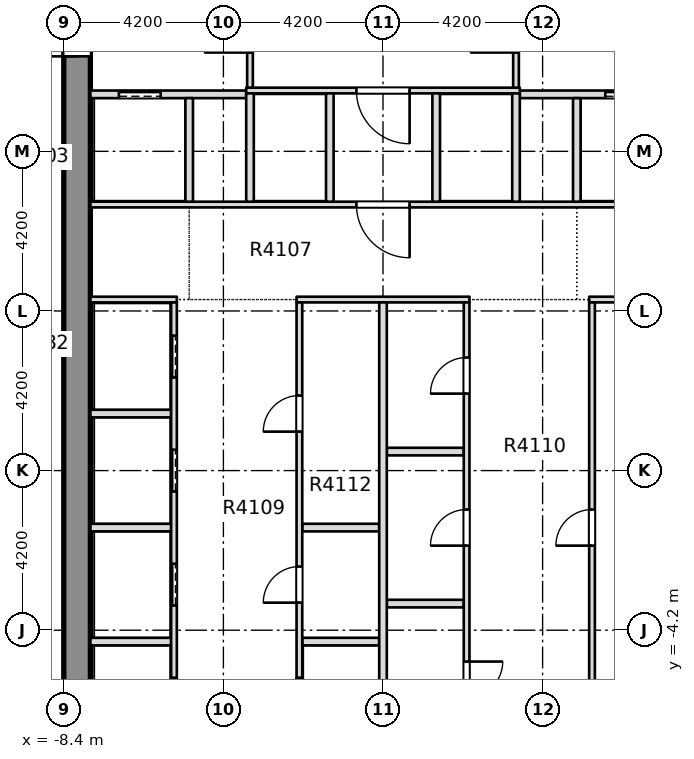
"""IFC4 building model, lengths in metres.
Left out: names, types, materials, properties, quantities, classifications, styles, units other than length and angle.
Written with IfcOpenShell. Run it as: python <this file> out.ifc"""

import sys

from ifc_helpers import new_model, si_unit, direction, frame, frame_2d, origin, place, context, subcontext, project, spatial, rectangle, extrude, element, fill, save


model = new_model("IFC4")
c1 = context("Model", 3, precision=1e-05, world=origin(), true_north=direction((0.0, 1.0)))
c2 = subcontext(c1, "Body", "Model", "MODEL_VIEW")
j1 = project(units=[si_unit("LENGTHUNIT", "METRE"), si_unit("PLANEANGLEUNIT", "RADIAN")], contexts=[c1])
p1 = place(None, origin())
s1 = spatial("IfcSite", under=j1, at=p1, CompositionType="ELEMENT")
p2 = place(p1, origin())
s2 = spatial("IfcBuilding", under=s1, at=p2, CompositionType="ELEMENT")
p3 = place(p2, frame((0.0, 0.0, 160.7)))
s3 = spatial("IfcBuildingStorey", under=s2, at=p3, CompositionType="ELEMENT", Elevation=160.7)
p4 = place(p3, frame((-8.05, -8.4, -0.4), z_axis=(0.0, 0.0, 1.0), x_axis=(0.0, 1.0, 0.0)))
e1 = element("IfcWall", 1, at=p4, inside=s3, PredefinedType="SOLIDWALL", context=c2, shape_type="SweptSolid", body=[
    extrude(rectangle(XDim=30.15, YDim=0.7, at=frame_2d((15.075, 0.0))), origin(), (0.0, 0.0, 1.0), 3.45),
])
p5 = place(p4, frame((19.3, 0.0, 0.4)))
e2 = element("IfcOpeningElement", 2, at=p5, cuts=e1, PredefinedType="OPENING", context=c2, shape_type="SweptSolid", body=[
    extrude(rectangle(XDim=1.2, YDim=2.1, at=frame_2d((0.6, 1.05))), frame((0.0, 0.36, 0.0), z_axis=(0.0, -1.0, 0.0), x_axis=(1.0, 0.0, 0.0)), (0.0, 0.0, 1.0), 0.72),
])
p6 = place(p3, frame((-7.699, -4.5, 0.0), z_axis=(0.0, 0.0, 1.0), x_axis=(1.0, 0.0, 0.0)))
e3 = element("IfcWall", 3, at=p6, inside=s3, PredefinedType="PARTITIONING", context=c2, shape_type="SweptSolid", body=[
    extrude(rectangle(XDim=2.124, YDim=0.2, at=frame_2d((1.062, 0.0))), origin(), (0.0, 0.0, 1.0), 3.05),
])
for number, where, z_axis, x_axis in (
    (4, (-2.125, -4.5, 0.0), (0.0, 0.0, 1.0), (1.0, 0.0, 0.0)),
    (5, (0.1, -3.5, 0.0), (0.0, 0.0, 1.0), (1.0, 0.0, 0.0)),
):
    element("IfcWall", number, at=place(p3, frame(where, z_axis=z_axis, x_axis=x_axis)), inside=s3, PredefinedType="PARTITIONING", context=c2, shape_type="SweptSolid", body=[
        extrude(rectangle(XDim=2.025, YDim=0.2, at=frame_2d((1.012, 0.0))), origin(), (0.0, 0.0, 1.0), 3.05),
    ])
p7 = place(p3, frame((-7.699, -1.5, 0.0), z_axis=(0.0, 0.0, 1.0), x_axis=(1.0, 0.0, 0.0)))
e6 = element("IfcWall", 6, at=p7, inside=s3, PredefinedType="PARTITIONING", context=c2, shape_type="SweptSolid", body=[
    extrude(rectangle(XDim=2.124, YDim=0.2, at=frame_2d((1.062, 0.0))), origin(), (0.0, 0.0, 1.0), 3.05),
])
for number, where, z_axis, x_axis in (
    (7, (-2.125, -1.5, 0.0), (0.0, 0.0, 1.0), (1.0, 0.0, 0.0)),
    (8, (0.1, 0.5, 0.0), (0.0, 0.0, 1.0), (1.0, 0.0, 0.0)),
):
    element("IfcWall", number, at=place(p3, frame(where, z_axis=z_axis, x_axis=x_axis)), inside=s3, PredefinedType="PARTITIONING", context=c2, shape_type="SweptSolid", body=[
        extrude(rectangle(XDim=2.025, YDim=0.2, at=frame_2d((1.012, 0.0))), origin(), (0.0, 0.0, 1.0), 3.05),
    ])
p8 = place(p3, frame((-7.699, 1.5, 0.0), z_axis=(0.0, 0.0, 1.0), x_axis=(1.0, 0.0, 0.0)))
e9 = element("IfcWall", 9, at=p8, inside=s3, PredefinedType="PARTITIONING", context=c2, shape_type="SweptSolid", body=[
    extrude(rectangle(XDim=2.124, YDim=0.2, at=frame_2d((1.062, 0.0))), origin(), (0.0, 0.0, 1.0), 3.05),
])
p9 = place(p3, frame((-7.699, 4.5, 0.0), z_axis=(0.0, 0.0, 1.0), x_axis=(1.0, 0.0, 0.0)))
e10 = element("IfcWall", 10, at=p9, inside=s3, PredefinedType="PARTITIONING", context=c2, shape_type="SweptSolid", body=[
    extrude(rectangle(XDim=2.274, YDim=0.15, at=frame_2d((1.137, 0.0))), origin(), (0.0, 0.0, 1.0), 3.05),
])
p10 = place(p3, frame((-2.275, 4.5, 0.0), z_axis=(0.0, 0.0, 1.0), x_axis=(1.0, 0.0, 0.0)))
e11 = element("IfcWall", 11, at=p10, inside=s3, PredefinedType="PARTITIONING", context=c2, shape_type="SweptSolid", body=[
    extrude(rectangle(XDim=4.55, YDim=0.15, at=frame_2d((2.275, 0.0))), origin(), (0.0, 0.0, 1.0), 3.05),
])
p11 = place(p3, frame((5.425, 4.5, 0.0), z_axis=(0.0, 0.0, 1.0), x_axis=(1.0, 0.0, 0.0)))
e12 = element("IfcWall", 12, at=p11, inside=s3, PredefinedType="PARTITIONING", context=c2, shape_type="SweptSolid", body=[
    extrude(rectangle(XDim=2.274, YDim=0.15, at=frame_2d((1.137, 0.0))), origin(), (0.0, 0.0, 1.0), 3.05),
])
p12 = place(p3, frame((-7.699, 7.0, 0.0), z_axis=(0.0, 0.0, 1.0), x_axis=(1.0, 0.0, 0.0)))
e13 = element("IfcWall", 13, at=p12, inside=s3, PredefinedType="PARTITIONING", context=c2, shape_type="SweptSolid", body=[
    extrude(rectangle(XDim=15.398, YDim=0.15, at=frame_2d((7.699, 0.0))), origin(), (0.0, 0.0, 1.0), 3.05),
])
p13 = place(p12, frame((6.999, 0.0, 0.0)))
e14 = element("IfcOpeningElement", 14, at=p13, cuts=e13, PredefinedType="OPENING", context=c2, shape_type="SweptSolid", body=[
    extrude(rectangle(XDim=1.4, YDim=2.1, at=frame_2d((0.7, 1.05))), frame((0.0, 0.085, 0.0), z_axis=(0.0, -1.0, 0.0), x_axis=(1.0, 0.0, 0.0)), (0.0, 0.0, 1.0), 0.17),
])
p14 = place(p3, frame((-7.699, 9.9, 0.0), z_axis=(0.0, 0.0, 1.0), x_axis=(1.0, 0.0, 0.0)))
e15 = element("IfcWall", 15, at=p14, inside=s3, PredefinedType="PARTITIONING", context=c2, shape_type="SweptSolid", body=[
    extrude(rectangle(XDim=4.099, YDim=0.2, at=frame_2d((2.049, 0.0))), origin(), (0.0, 0.0, 1.0), 3.05),
])
p15 = place(p14, frame((0.749, 0.0, 0.0)))
e16 = element("IfcOpeningElement", 16, at=p15, cuts=e15, PredefinedType="OPENING", context=c2, shape_type="SweptSolid", body=[
    extrude(rectangle(XDim=1.1, YDim=2.1, at=frame_2d((0.55, 1.05))), frame((0.0, 0.11, 0.0), z_axis=(0.0, -1.0, 0.0), x_axis=(1.0, 0.0, 0.0)), (0.0, 0.0, 1.0), 0.22),
])
p16 = place(p3, frame((3.6, 9.9, 0.0), z_axis=(0.0, 0.0, 1.0), x_axis=(1.0, 0.0, 0.0)))
e17 = element("IfcWall", 17, at=p16, inside=s3, PredefinedType="PARTITIONING", context=c2, shape_type="SweptSolid", body=[
    extrude(rectangle(XDim=4.099, YDim=0.2, at=frame_2d((2.049, 0.0))), origin(), (0.0, 0.0, 1.0), 3.05),
])
p17 = place(p16, frame((2.25, 0.0, 0.0)))
e18 = element("IfcOpeningElement", 18, at=p17, cuts=e17, PredefinedType="OPENING", context=c2, shape_type="SweptSolid", body=[
    extrude(rectangle(XDim=1.1, YDim=2.1, at=frame_2d((0.55, 1.05))), frame((0.0, 0.11, 0.0), z_axis=(0.0, -1.0, 0.0), x_axis=(1.0, 0.0, 0.0)), (0.0, 0.0, 1.0), 0.22),
])
p18 = place(p3, frame((-3.6, 10.0, 0.0), z_axis=(0.0, 0.0, 1.0), x_axis=(1.0, 0.0, 0.0)))
e19 = element("IfcWall", 19, at=p18, inside=s3, PredefinedType="PARTITIONING", context=c2, shape_type="SweptSolid", body=[
    extrude(rectangle(XDim=7.2, YDim=0.15, at=frame_2d((3.6, 0.0))), origin(), (0.0, 0.0, 1.0), 3.05),
])
p19 = place(p18, frame((2.9, 0.0, 0.0)))
e20 = element("IfcOpeningElement", 20, at=p19, cuts=e19, PredefinedType="OPENING", context=c2, shape_type="SweptSolid", body=[
    extrude(rectangle(XDim=1.4, YDim=2.1, at=frame_2d((0.7, 1.05))), frame((0.0, 0.085, 0.0), z_axis=(0.0, -1.0, 0.0), x_axis=(1.0, 0.0, 0.0)), (0.0, 0.0, 1.0), 0.17),
])
p20 = place(p3, frame((-5.5, -7.699, 0.0), z_axis=(0.0, 0.0, 1.0), x_axis=(0.0, 1.0, 0.0)))
e21 = element("IfcWall", 21, at=p20, inside=s3, PredefinedType="PARTITIONING", context=c2, shape_type="SweptSolid", body=[
    extrude(rectangle(XDim=12.124, YDim=0.15, at=frame_2d((6.062, 0.0))), origin(), (0.0, 0.0, 1.0), 3.05),
])
p21 = place(p20, frame((1.149, 0.0, 0.0)))
e22 = element("IfcOpeningElement", 22, at=p21, cuts=e21, PredefinedType="OPENING", context=c2, shape_type="SweptSolid", body=[
    extrude(rectangle(XDim=1.1, YDim=2.1, at=frame_2d((0.55, 1.05))), frame((0.0, 0.085, 0.0), z_axis=(0.0, -1.0, 0.0), x_axis=(1.0, 0.0, 0.0)), (0.0, 0.0, 1.0), 0.17),
])
p22 = place(p20, frame((4.149, 0.0, 0.0)))
e23 = element("IfcOpeningElement", 23, at=p22, cuts=e21, PredefinedType="OPENING", context=c2, shape_type="SweptSolid", body=[
    extrude(rectangle(XDim=1.1, YDim=2.1, at=frame_2d((0.55, 1.05))), frame((0.0, 0.085, 0.0), z_axis=(0.0, -1.0, 0.0), x_axis=(1.0, 0.0, 0.0)), (0.0, 0.0, 1.0), 0.17),
])
p23 = place(p20, frame((7.149, 0.0, 0.0)))
e24 = element("IfcOpeningElement", 24, at=p23, cuts=e21, PredefinedType="OPENING", context=c2, shape_type="SweptSolid", body=[
    extrude(rectangle(XDim=1.1, YDim=2.1, at=frame_2d((0.55, 1.05))), frame((0.0, 0.085, 0.0), z_axis=(0.0, -1.0, 0.0), x_axis=(1.0, 0.0, 0.0)), (0.0, 0.0, 1.0), 0.17),
])
p24 = place(p20, frame((10.149, 0.0, 0.0)))
e25 = element("IfcOpeningElement", 25, at=p24, cuts=e21, PredefinedType="OPENING", context=c2, shape_type="SweptSolid", body=[
    extrude(rectangle(XDim=1.1, YDim=2.1, at=frame_2d((0.55, 1.05))), frame((0.0, 0.085, 0.0), z_axis=(0.0, -1.0, 0.0), x_axis=(1.0, 0.0, 0.0)), (0.0, 0.0, 1.0), 0.17),
])
p25 = place(p3, frame((-5.1, 7.075, 0.0), z_axis=(0.0, 0.0, 1.0), x_axis=(0.0, 1.0, 0.0)))
e26 = element("IfcWall", 26, at=p25, inside=s3, PredefinedType="PARTITIONING", context=c2, shape_type="SweptSolid", body=[
    extrude(rectangle(XDim=2.725, YDim=0.2, at=frame_2d((1.363, 0.0))), origin(), (0.0, 0.0, 1.0), 3.05),
])
p26 = place(p3, frame((-3.5, 7.075, 0.0), z_axis=(0.0, 0.0, 1.0), x_axis=(0.0, 1.0, 0.0)))
e27 = element("IfcWall", 27, at=p26, inside=s3, PredefinedType="PARTITIONING", context=c2, shape_type="SweptSolid", body=[
    extrude(rectangle(XDim=2.85, YDim=0.2, at=frame_2d((1.425, 0.0))), origin(), (0.0, 0.0, 1.0), 3.05),
])
p27 = place(p3, frame((-3.5, 10.075, 0.0), z_axis=(0.0, 0.0, 1.0), x_axis=(0.0, 1.0, 0.0)))
e28 = element("IfcWall", 28, at=p27, inside=s3, PredefinedType="PARTITIONING", context=c2, shape_type="SweptSolid", body=[
    extrude(rectangle(XDim=3.075, YDim=0.15, at=frame_2d((1.538, 0.0))), origin(), (0.0, 0.0, 1.0), 3.05),
])
p28 = place(p27, frame((0.925, 0.0, 0.0)))
e29 = element("IfcOpeningElement", 29, at=p28, cuts=e28, PredefinedType="OPENING", context=c2, shape_type="SweptSolid", body=[
    extrude(rectangle(XDim=1.2, YDim=2.1, at=frame_2d((0.6, 1.05))), frame((0.0, 0.085, 0.0), z_axis=(0.0, -1.0, 0.0), x_axis=(1.0, 0.0, 0.0)), (0.0, 0.0, 1.0), 0.17),
])
p29 = place(p3, frame((-2.2, -7.699, 0.0), z_axis=(0.0, 0.0, 1.0), x_axis=(0.0, 1.0, 0.0)))
e30 = element("IfcWall", 30, at=p29, inside=s3, PredefinedType="PARTITIONING", context=c2, shape_type="SweptSolid", body=[
    extrude(rectangle(XDim=12.124, YDim=0.15, at=frame_2d((6.062, 0.0))), origin(), (0.0, 0.0, 1.0), 3.05),
])
p30 = place(p29, frame((1.149, 0.0, 0.0)))
e31 = element("IfcOpeningElement", 31, at=p30, cuts=e30, PredefinedType="OPENING", context=c2, shape_type="SweptSolid", body=[
    extrude(rectangle(XDim=1.1, YDim=2.1, at=frame_2d((0.55, 1.05))), frame((0.0, 0.085, 0.0), z_axis=(0.0, -1.0, 0.0), x_axis=(1.0, 0.0, 0.0)), (0.0, 0.0, 1.0), 0.17),
])
p31 = place(p29, frame((4.224, 0.0, 0.0)))
e32 = element("IfcOpeningElement", 32, at=p31, cuts=e30, PredefinedType="OPENING", context=c2, shape_type="SweptSolid", body=[
    extrude(rectangle(XDim=0.95, YDim=2.1, at=frame_2d((0.475, 1.05))), frame((0.0, 0.085, 0.0), z_axis=(0.0, -1.0, 0.0), x_axis=(1.0, 0.0, 0.0)), (0.0, 0.0, 1.0), 0.17),
])
p32 = place(p29, frame((8.724, 0.0, 0.0)))
e33 = element("IfcOpeningElement", 33, at=p32, cuts=e30, PredefinedType="OPENING", context=c2, shape_type="SweptSolid", body=[
    extrude(rectangle(XDim=0.95, YDim=2.1, at=frame_2d((0.475, 1.05))), frame((0.0, 0.085, 0.0), z_axis=(0.0, -1.0, 0.0), x_axis=(1.0, 0.0, 0.0)), (0.0, 0.0, 1.0), 0.17),
])
p33 = place(p3, frame((-1.4, 7.075, 0.0), z_axis=(0.0, 0.0, 1.0), x_axis=(0.0, 1.0, 0.0)))
e34 = element("IfcWall", 34, at=p33, inside=s3, PredefinedType="PARTITIONING", context=c2, shape_type="SweptSolid", body=[
    extrude(rectangle(XDim=2.85, YDim=0.2, at=frame_2d((1.425, 0.0))), origin(), (0.0, 0.0, 1.0), 3.05),
])
p34 = place(p3, frame((0.0, -7.699, 0.0), z_axis=(0.0, 0.0, 1.0), x_axis=(0.0, 1.0, 0.0)))
e35 = element("IfcWall", 35, at=p34, inside=s3, PredefinedType="PARTITIONING", context=c2, shape_type="SweptSolid", body=[
    extrude(rectangle(XDim=12.124, YDim=0.2, at=frame_2d((6.062, 0.0))), origin(), (0.0, 0.0, 1.0), 3.05),
])
p35 = place(p3, frame((1.4, 7.075, 0.0), z_axis=(0.0, 0.0, 1.0), x_axis=(0.0, 1.0, 0.0)))
e36 = element("IfcWall", 36, at=p35, inside=s3, PredefinedType="PARTITIONING", context=c2, shape_type="SweptSolid", body=[
    extrude(rectangle(XDim=2.85, YDim=0.2, at=frame_2d((1.425, 0.0))), origin(), (0.0, 0.0, 1.0), 3.05),
])
p36 = place(p3, frame((2.2, -7.699, 0.0), z_axis=(0.0, 0.0, 1.0), x_axis=(0.0, 1.0, 0.0)))
e37 = element("IfcWall", 37, at=p36, inside=s3, PredefinedType="PARTITIONING", context=c2, shape_type="SweptSolid", body=[
    extrude(rectangle(XDim=12.124, YDim=0.15, at=frame_2d((6.062, 0.0))), origin(), (0.0, 0.0, 1.0), 3.05),
])
p37 = place(p36, frame((1.724, 0.0, 0.0)))
e38 = element("IfcOpeningElement", 38, at=p37, cuts=e37, PredefinedType="OPENING", context=c2, shape_type="SweptSolid", body=[
    extrude(rectangle(XDim=0.95, YDim=2.1, at=frame_2d((0.475, 1.05))), frame((0.0, 0.085, 0.0), z_axis=(0.0, -1.0, 0.0), x_axis=(1.0, 0.0, 0.0)), (0.0, 0.0, 1.0), 0.17),
])
p38 = place(p36, frame((5.724, 0.0, 0.0)))
e39 = element("IfcOpeningElement", 39, at=p38, cuts=e37, PredefinedType="OPENING", context=c2, shape_type="SweptSolid", body=[
    extrude(rectangle(XDim=0.95, YDim=2.1, at=frame_2d((0.475, 1.05))), frame((0.0, 0.085, 0.0), z_axis=(0.0, -1.0, 0.0), x_axis=(1.0, 0.0, 0.0)), (0.0, 0.0, 1.0), 0.17),
])
p39 = place(p36, frame((9.724, 0.0, 0.0)))
e40 = element("IfcOpeningElement", 40, at=p39, cuts=e37, PredefinedType="OPENING", context=c2, shape_type="SweptSolid", body=[
    extrude(rectangle(XDim=0.95, YDim=2.1, at=frame_2d((0.475, 1.05))), frame((0.0, 0.085, 0.0), z_axis=(0.0, -1.0, 0.0), x_axis=(1.0, 0.0, 0.0)), (0.0, 0.0, 1.0), 0.17),
])
p40 = place(p3, frame((3.5, 7.075, 0.0), z_axis=(0.0, 0.0, 1.0), x_axis=(0.0, 1.0, 0.0)))
e41 = element("IfcWall", 41, at=p40, inside=s3, PredefinedType="PARTITIONING", context=c2, shape_type="SweptSolid", body=[
    extrude(rectangle(XDim=2.85, YDim=0.2, at=frame_2d((1.425, 0.0))), origin(), (0.0, 0.0, 1.0), 3.05),
])
p41 = place(p3, frame((3.5, 10.075, 0.0), z_axis=(0.0, 0.0, 1.0), x_axis=(0.0, 1.0, 0.0)))
e42 = element("IfcWall", 42, at=p41, inside=s3, PredefinedType="PARTITIONING", context=c2, shape_type="SweptSolid", body=[
    extrude(rectangle(XDim=3.075, YDim=0.15, at=frame_2d((1.538, 0.0))), origin(), (0.0, 0.0, 1.0), 3.05),
])
p42 = place(p41, frame((0.925, 0.0, 0.0)))
e43 = element("IfcOpeningElement", 43, at=p42, cuts=e42, PredefinedType="OPENING", context=c2, shape_type="SweptSolid", body=[
    extrude(rectangle(XDim=1.2, YDim=2.1, at=frame_2d((0.6, 1.05))), frame((0.0, 0.085, 0.0), z_axis=(0.0, -1.0, 0.0), x_axis=(1.0, 0.0, 0.0)), (0.0, 0.0, 1.0), 0.17),
])
p43 = place(p3, frame((5.1, 7.075, 0.0), z_axis=(0.0, 0.0, 1.0), x_axis=(0.0, 1.0, 0.0)))
e44 = element("IfcWall", 44, at=p43, inside=s3, PredefinedType="PARTITIONING", context=c2, shape_type="SweptSolid", body=[
    extrude(rectangle(XDim=2.725, YDim=0.2, at=frame_2d((1.363, 0.0))), origin(), (0.0, 0.0, 1.0), 3.05),
])
p44 = place(p3, frame((5.5, -7.699, 0.0), z_axis=(0.0, 0.0, 1.0), x_axis=(0.0, 1.0, 0.0)))
e45 = element("IfcWall", 45, at=p44, inside=s3, PredefinedType="PARTITIONING", context=c2, shape_type="SweptSolid", body=[
    extrude(rectangle(XDim=12.124, YDim=0.15, at=frame_2d((6.062, 0.0))), origin(), (0.0, 0.0, 1.0), 3.05),
])
p45 = place(p44, frame((5.724, 0.0, 0.0)))
e46 = element("IfcOpeningElement", 46, at=p45, cuts=e45, PredefinedType="OPENING", context=c2, shape_type="SweptSolid", body=[
    extrude(rectangle(XDim=0.95, YDim=2.1, at=frame_2d((0.475, 1.05))), frame((0.0, 0.085, 0.0), z_axis=(0.0, -1.0, 0.0), x_axis=(1.0, 0.0, 0.0)), (0.0, 0.0, 1.0), 0.17),
])
p46 = place(p21, origin())
e47 = element("IfcDoor", 47, at=p46, inside=s3, OperationType="SLIDING_TO_LEFT", PredefinedType="DOOR", context=c2, shape_type="SweptSolid", body=[
    extrude(rectangle(XDim=1.1, YDim=2.1, at=frame_2d((0.55, 1.05))), frame((0.0, 0.025, 0.0), z_axis=(0.0, -1.0, 0.0), x_axis=(1.0, 0.0, 0.0)), (0.0, 0.0, 1.0), 0.05),
])
fill(e22, e47)
p47 = place(p22, origin())
e48 = element("IfcDoor", 48, at=p47, inside=s3, OperationType="SLIDING_TO_LEFT", PredefinedType="DOOR", context=c2, shape_type="SweptSolid", body=[
    extrude(rectangle(XDim=1.1, YDim=2.1, at=frame_2d((0.55, 1.05))), frame((0.0, 0.025, 0.0), z_axis=(0.0, -1.0, 0.0), x_axis=(1.0, 0.0, 0.0)), (0.0, 0.0, 1.0), 0.05),
])
fill(e23, e48)
p48 = place(p23, origin())
e49 = element("IfcDoor", 49, at=p48, inside=s3, OperationType="SLIDING_TO_LEFT", PredefinedType="DOOR", context=c2, shape_type="SweptSolid", body=[
    extrude(rectangle(XDim=1.1, YDim=2.1, at=frame_2d((0.55, 1.05))), frame((0.0, 0.025, 0.0), z_axis=(0.0, -1.0, 0.0), x_axis=(1.0, 0.0, 0.0)), (0.0, 0.0, 1.0), 0.05),
])
fill(e24, e49)
p49 = place(p24, origin())
e50 = element("IfcDoor", 50, at=p49, inside=s3, OperationType="SLIDING_TO_LEFT", PredefinedType="DOOR", context=c2, shape_type="SweptSolid", body=[
    extrude(rectangle(XDim=1.1, YDim=2.1, at=frame_2d((0.55, 1.05))), frame((0.0, 0.025, 0.0), z_axis=(0.0, -1.0, 0.0), x_axis=(1.0, 0.0, 0.0)), (0.0, 0.0, 1.0), 0.05),
])
fill(e25, e50)
p50 = place(p30, origin())
e51 = element("IfcDoor", 51, at=p50, inside=s3, OperationType="SLIDING_TO_LEFT", PredefinedType="DOOR", context=c2, shape_type="SweptSolid", body=[
    extrude(rectangle(XDim=1.1, YDim=2.1, at=frame_2d((0.55, 1.05))), frame((0.0, 0.025, 0.0), z_axis=(0.0, -1.0, 0.0), x_axis=(1.0, 0.0, 0.0)), (0.0, 0.0, 1.0), 0.05),
])
fill(e31, e51)
p51 = place(p31, origin())
e52 = element("IfcDoor", 52, at=p51, inside=s3, OperationType="SINGLE_SWING_RIGHT", PredefinedType="DOOR", context=c2, shape_type="SweptSolid", body=[
    extrude(rectangle(XDim=0.95, YDim=2.1, at=frame_2d((0.475, 1.05))), frame((0.0, 0.025, 0.0), z_axis=(0.0, -1.0, 0.0), x_axis=(1.0, 0.0, 0.0)), (0.0, 0.0, 1.0), 0.05),
])
fill(e32, e52)
p52 = place(p32, origin())
e53 = element("IfcDoor", 53, at=p52, inside=s3, OperationType="SINGLE_SWING_LEFT", PredefinedType="DOOR", context=c2, shape_type="SweptSolid", body=[
    extrude(rectangle(XDim=0.95, YDim=2.1, at=frame_2d((0.475, 1.05))), frame((0.0, 0.025, 0.0), z_axis=(0.0, -1.0, 0.0), x_axis=(1.0, 0.0, 0.0)), (0.0, 0.0, 1.0), 0.05),
])
fill(e33, e53)
p53 = place(p37, origin())
e54 = element("IfcDoor", 54, at=p53, inside=s3, OperationType="SINGLE_SWING_RIGHT", PredefinedType="DOOR", context=c2, shape_type="SweptSolid", body=[
    extrude(rectangle(XDim=0.95, YDim=2.1, at=frame_2d((0.475, 1.05))), frame((0.0, 0.025, 0.0), z_axis=(0.0, -1.0, 0.0), x_axis=(1.0, 0.0, 0.0)), (0.0, 0.0, 1.0), 0.05),
])
fill(e38, e54)
p54 = place(p38, origin())
e55 = element("IfcDoor", 55, at=p54, inside=s3, OperationType="SINGLE_SWING_RIGHT", PredefinedType="DOOR", context=c2, shape_type="SweptSolid", body=[
    extrude(rectangle(XDim=0.95, YDim=2.1, at=frame_2d((0.475, 1.05))), frame((0.0, 0.025, 0.0), z_axis=(0.0, -1.0, 0.0), x_axis=(1.0, 0.0, 0.0)), (0.0, 0.0, 1.0), 0.05),
])
fill(e39, e55)
p55 = place(p39, origin())
e56 = element("IfcDoor", 56, at=p55, inside=s3, OperationType="SINGLE_SWING_LEFT", PredefinedType="DOOR", context=c2, shape_type="SweptSolid", body=[
    extrude(rectangle(XDim=0.95, YDim=2.1, at=frame_2d((0.475, 1.05))), frame((0.0, 0.025, 0.0), z_axis=(0.0, -1.0, 0.0), x_axis=(1.0, 0.0, 0.0)), (0.0, 0.0, 1.0), 0.05),
])
fill(e40, e56)
p56 = place(p45, origin())
e57 = element("IfcDoor", 57, at=p56, inside=s3, OperationType="SINGLE_SWING_LEFT", PredefinedType="DOOR", context=c2, shape_type="SweptSolid", body=[
    extrude(rectangle(XDim=0.95, YDim=2.1, at=frame_2d((0.475, 1.05))), frame((0.0, 0.025, 0.0), z_axis=(0.0, -1.0, 0.0), x_axis=(1.0, 0.0, 0.0)), (0.0, 0.0, 1.0), 0.05),
])
fill(e46, e57)
p57 = place(p15, origin())
e58 = element("IfcDoor", 58, at=p57, inside=s3, OperationType="SLIDING_TO_RIGHT", PredefinedType="DOOR", context=c2, shape_type="SweptSolid", body=[
    extrude(rectangle(XDim=1.1, YDim=2.1, at=frame_2d((0.55, 1.05))), frame((0.0, 0.025, 0.0), z_axis=(0.0, -1.0, 0.0), x_axis=(1.0, 0.0, 0.0)), (0.0, 0.0, 1.0), 0.05),
])
fill(e16, e58)
p58 = place(p17, origin())
e59 = element("IfcDoor", 59, at=p58, inside=s3, OperationType="SLIDING_TO_LEFT", PredefinedType="DOOR", context=c2, shape_type="SweptSolid", body=[
    extrude(rectangle(XDim=1.1, YDim=2.1, at=frame_2d((0.55, 1.05))), frame((0.0, 0.025, 0.0), z_axis=(0.0, -1.0, 0.0), x_axis=(1.0, 0.0, 0.0)), (0.0, 0.0, 1.0), 0.05),
])
fill(e18, e59)
p59 = place(p13, origin())
e60 = element("IfcDoor", 60, at=p59, inside=s3, OperationType="SINGLE_SWING_RIGHT", PredefinedType="DOOR", context=c2, shape_type="SweptSolid", body=[
    extrude(rectangle(XDim=1.4, YDim=2.1, at=frame_2d((0.7, 1.05))), frame((0.0, 0.025, 0.0), z_axis=(0.0, -1.0, 0.0), x_axis=(1.0, 0.0, 0.0)), (0.0, 0.0, 1.0), 0.05),
])
fill(e14, e60)
p60 = place(p19, origin())
e61 = element("IfcDoor", 61, at=p60, inside=s3, OperationType="SINGLE_SWING_RIGHT", PredefinedType="DOOR", context=c2, shape_type="SweptSolid", body=[
    extrude(rectangle(XDim=1.4, YDim=2.1, at=frame_2d((0.7, 1.05))), frame((0.0, 0.025, 0.0), z_axis=(0.0, -1.0, 0.0), x_axis=(1.0, 0.0, 0.0)), (0.0, 0.0, 1.0), 0.05),
])
fill(e20, e61)
p61 = place(p5, origin())
e62 = element("IfcDoor", 62, at=p61, inside=s3, OperationType="SINGLE_SWING_LEFT", PredefinedType="DOOR", context=c2, shape_type="SweptSolid", body=[
    extrude(rectangle(XDim=1.2, YDim=2.1, at=frame_2d((0.6, 1.05))), frame((0.0, 0.025, 0.0), z_axis=(0.0, -1.0, 0.0), x_axis=(1.0, 0.0, 0.0)), (0.0, 0.0, 1.0), 0.05),
])
fill(e2, e62)
save(model, sys.argv[1])
